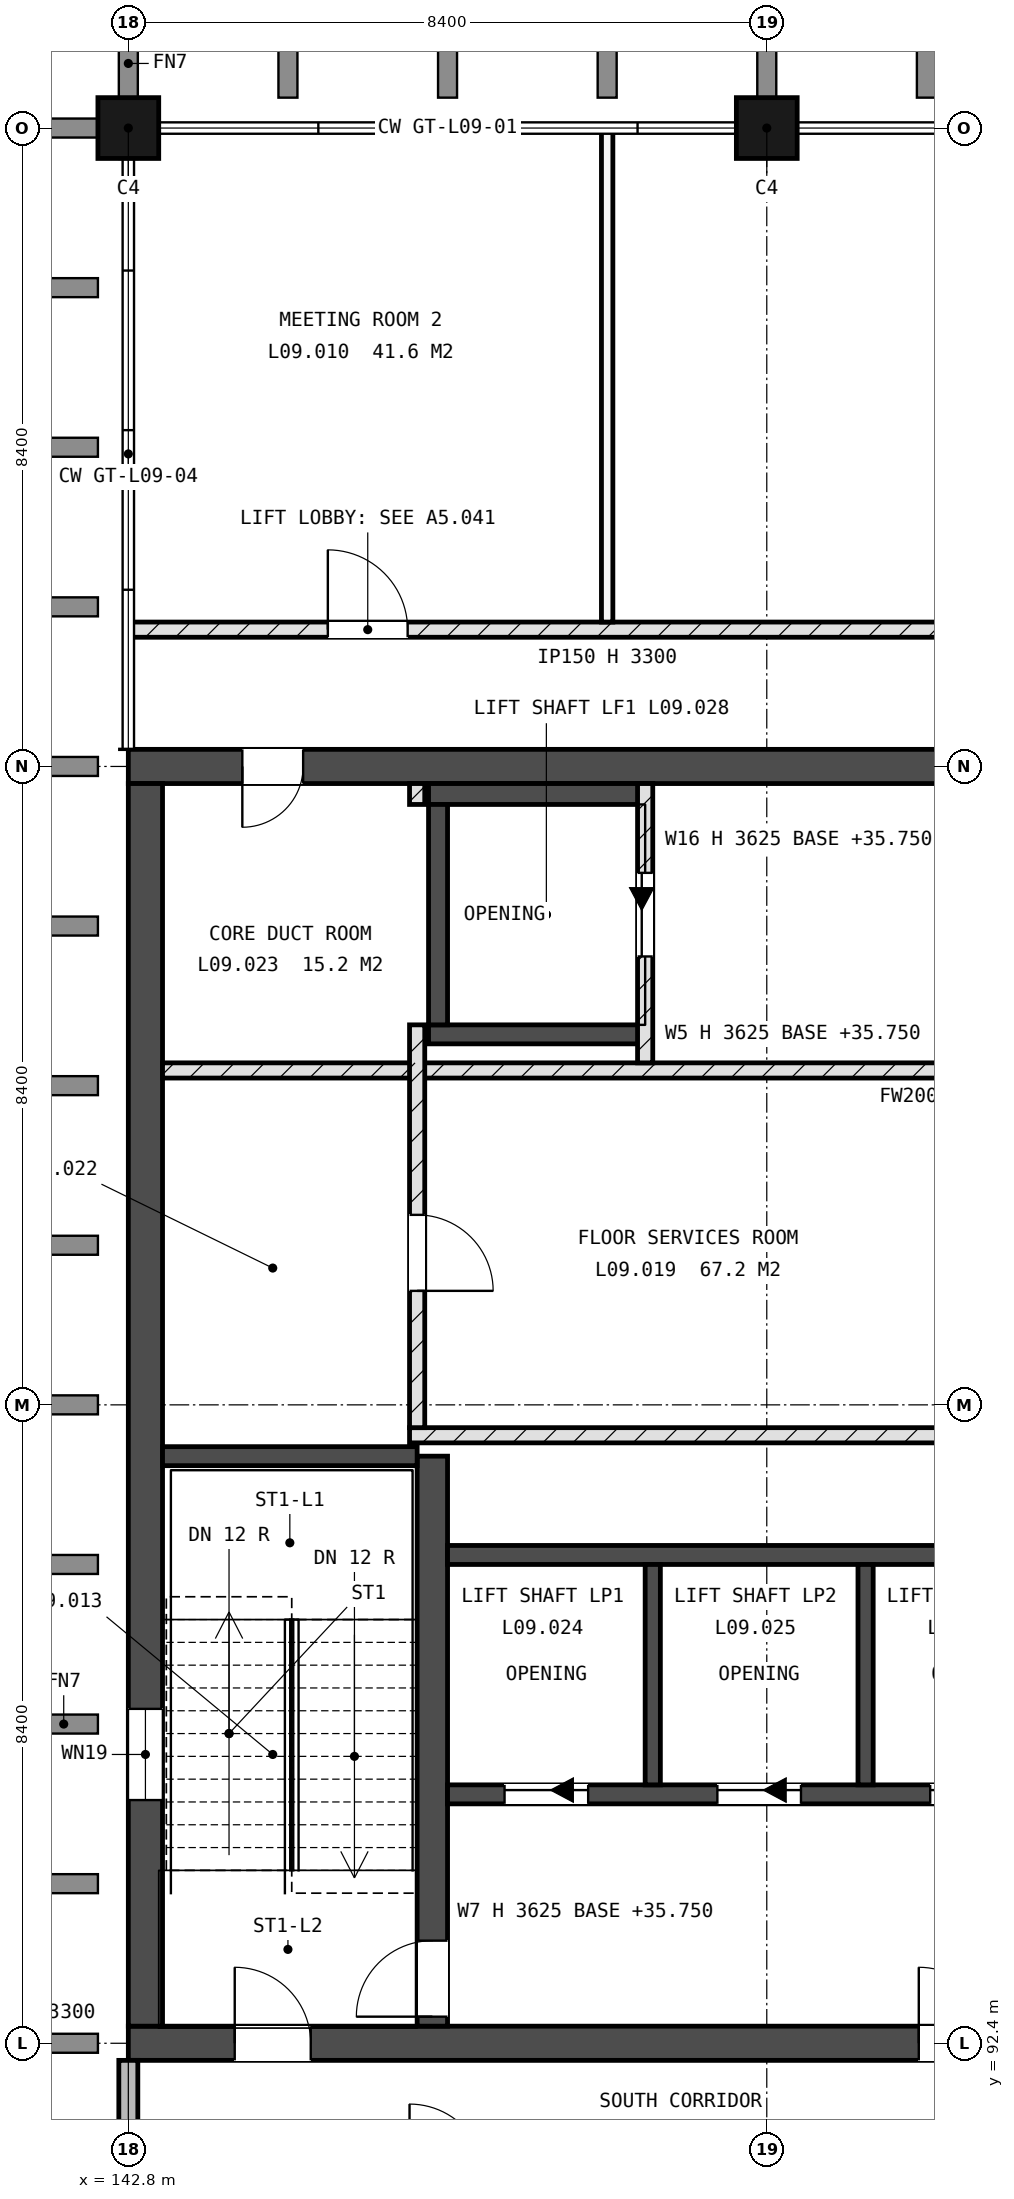
"""IFC4 building model, lengths in metres.
Left out: names, types, materials, properties, quantities, classifications, styles, units other than length and angle.
Written with IfcOpenShell. Run it as: python <this file> out.ifc"""

import sys

from ifc_helpers import new_model, si_unit, direction, frame, frame_2d, origin, origin_2d, place, context, subcontext, project, spatial, rectangle, extrude, element, fill, save


model = new_model("IFC4")
c1 = context("Model", 3, precision=1e-05, world=origin(), true_north=direction((0.0, 1.0)))
c2 = subcontext(c1, "Body", "Model", "MODEL_VIEW")
j1 = project(units=[si_unit("LENGTHUNIT", "METRE"), si_unit("PLANEANGLEUNIT", "RADIAN")], contexts=[c1])
p1 = place(None, origin())
s1 = spatial("IfcSite", under=j1, at=p1, CompositionType="ELEMENT")
p2 = place(p1, origin())
s2 = spatial("IfcBuilding", under=s1, at=p2, CompositionType="ELEMENT")
p3 = place(p2, frame((0.0, 0.0, 36.0)))
s3 = spatial("IfcBuildingStorey", under=s2, at=p3, CompositionType="ELEMENT", Elevation=36.0)
for number, where, z_axis, x_axis in (
    (1, (142.8, 117.6, -0.25), (0.0, 0.0, 1.0), (1.0, 0.0, 0.0)),
    (2, (151.2, 117.6, -0.25), (0.0, 0.0, 1.0), (1.0, 0.0, 0.0)),
):
    element("IfcColumn", number, at=place(p3, frame(where, z_axis=z_axis, x_axis=x_axis)), inside=s3, PredefinedType="COLUMN", context=c2, shape_type="SweptSolid", body=[
        extrude(rectangle(XDim=0.8, YDim=0.8, at=origin_2d()), origin(), (0.0, 0.0, 1.0), 3.625),
    ])
p4 = place(p3, frame((142.8, 92.4, -0.25), z_axis=(0.0, 0.0, 1.0), x_axis=(1.0, 0.0, 0.0)))
e3 = element("IfcWall", 3, at=p4, inside=s3, PredefinedType="SHEAR", context=c2, shape_type="SweptSolid", body=[
    extrude(rectangle(XDim=25.2, YDim=0.45, at=frame_2d((12.6, 0.0))), origin(), (0.0, 0.0, 1.0), 3.625),
])
p5 = place(p4, frame((1.4, 0.0, 0.25)))
e4 = element("IfcOpeningElement", 4, at=p5, cuts=e3, PredefinedType="OPENING", context=c2, shape_type="SweptSolid", body=[
    extrude(rectangle(XDim=1.0, YDim=2.1, at=frame_2d((0.5, 1.05))), frame((0.0, 0.235, 0.0), z_axis=(0.0, -1.0, 0.0), x_axis=(1.0, 0.0, 0.0)), (0.0, 0.0, 1.0), 0.47),
])
p6 = place(p4, frame((19.1, 0.0, 0.25)))
e5 = element("IfcOpeningElement", 5, at=p6, cuts=e3, PredefinedType="OPENING", context=c2, shape_type="SweptSolid", body=[
    extrude(rectangle(XDim=1.0, YDim=2.1, at=frame_2d((0.5, 1.05))), frame((0.0, 0.235, 0.0), z_axis=(0.0, -1.0, 0.0), x_axis=(1.0, 0.0, 0.0)), (0.0, 0.0, 1.0), 0.47),
])
p7 = place(p4, frame((10.4, 0.0, 0.25)))
e6 = element("IfcOpeningElement", 6, at=p7, cuts=e3, PredefinedType="OPENING", context=c2, shape_type="SweptSolid", body=[
    extrude(rectangle(XDim=1.0, YDim=2.1, at=frame_2d((0.5, 1.05))), frame((0.0, 0.235, 0.0), z_axis=(0.0, -1.0, 0.0), x_axis=(1.0, 0.0, 0.0)), (0.0, 0.0, 1.0), 0.47),
])
p8 = place(p3, frame((142.8, 109.2, -0.25), z_axis=(0.0, 0.0, 1.0), x_axis=(1.0, 0.0, 0.0)))
e7 = element("IfcWall", 7, at=p8, inside=s3, PredefinedType="SHEAR", context=c2, shape_type="SweptSolid", body=[
    extrude(rectangle(XDim=25.2, YDim=0.45, at=frame_2d((12.6, 0.0))), origin(), (0.0, 0.0, 1.0), 3.625),
])
p9 = place(p8, frame((22.8, 0.0, 0.25)))
e8 = element("IfcOpeningElement", 8, at=p9, cuts=e7, PredefinedType="OPENING", context=c2, shape_type="SweptSolid", body=[
    extrude(rectangle(XDim=1.0, YDim=2.1, at=frame_2d((0.5, 1.05))), frame((0.0, 0.235, 0.0), z_axis=(0.0, -1.0, 0.0), x_axis=(1.0, 0.0, 0.0)), (0.0, 0.0, 1.0), 0.47),
])
p10 = place(p8, frame((1.5, 0.0, 0.25)))
e9 = element("IfcOpeningElement", 9, at=p10, cuts=e7, PredefinedType="OPENING", context=c2, shape_type="SweptSolid", body=[
    extrude(rectangle(XDim=0.8, YDim=2.1, at=frame_2d((0.4, 1.05))), frame((0.0, 0.235, 0.0), z_axis=(0.0, -1.0, 0.0), x_axis=(1.0, 0.0, 0.0)), (0.0, 0.0, 1.0), 0.47),
])
p11 = place(p8, frame((13.4, 0.0, 0.25)))
e10 = element("IfcOpeningElement", 10, at=p11, cuts=e7, PredefinedType="OPENING", context=c2, shape_type="SweptSolid", body=[
    extrude(rectangle(XDim=1.0, YDim=2.1, at=frame_2d((0.5, 1.05))), frame((0.0, 0.235, 0.0), z_axis=(0.0, -1.0, 0.0), x_axis=(1.0, 0.0, 0.0)), (0.0, 0.0, 1.0), 0.47),
])
p12 = place(p3, frame((143.025, 92.625, -0.25), z_axis=(0.0, 0.0, 1.0), x_axis=(0.0, 1.0, 0.0)))
e11 = element("IfcWall", 11, at=p12, inside=s3, PredefinedType="SHEAR", context=c2, shape_type="SweptSolid", body=[
    extrude(rectangle(XDim=16.35, YDim=0.45, at=frame_2d((8.175, 0.0))), origin(), (0.0, 0.0, 1.0), 3.625),
])
p13 = place(p12, frame((2.975, 0.0, 1.85)))
e12 = element("IfcOpeningElement", 12, at=p13, cuts=e11, PredefinedType="OPENING", context=c2, shape_type="SweptSolid", body=[
    extrude(rectangle(XDim=1.2, YDim=0.9, at=frame_2d((0.6, 0.45))), frame((0.0, 0.235, 0.0), z_axis=(0.0, -1.0, 0.0), x_axis=(1.0, 0.0, 0.0)), (0.0, 0.0, 1.0), 0.47),
])
p14 = place(p3, frame((146.8, 92.625, -0.25), z_axis=(0.0, 0.0, 1.0), x_axis=(0.0, 1.0, 0.0)))
e13 = element("IfcWall", 13, at=p14, inside=s3, PredefinedType="SHEAR", context=c2, shape_type="SweptSolid", body=[
    extrude(rectangle(XDim=7.5, YDim=0.4, at=frame_2d((3.75, 0.0))), origin(), (0.0, 0.0, 1.0), 3.625),
])
p15 = place(p14, frame((0.125, 0.0, 0.25)))
e14 = element("IfcOpeningElement", 14, at=p15, cuts=e13, PredefinedType="OPENING", context=c2, shape_type="SweptSolid", body=[
    extrude(rectangle(XDim=1.0, YDim=2.1, at=frame_2d((0.5, 1.05))), frame((0.0, 0.21, 0.0), z_axis=(0.0, -1.0, 0.0), x_axis=(1.0, 0.0, 0.0)), (0.0, 0.0, 1.0), 0.42),
])
p16 = place(p3, frame((143.25, 100.125, -0.25), z_axis=(0.0, 0.0, 1.0), x_axis=(1.0, 0.0, 0.0)))
e15 = element("IfcWall", 15, at=p16, inside=s3, PredefinedType="SHEAR", context=c2, shape_type="SweptSolid", body=[
    extrude(rectangle(XDim=3.35, YDim=0.25, at=frame_2d((1.675, 0.0))), origin(), (0.0, 0.0, 1.0), 3.625),
])
p17 = place(p3, frame((147.0, 95.675, -0.25), z_axis=(0.0, 0.0, 1.0), x_axis=(1.0, 0.0, 0.0)))
e16 = element("IfcWall", 16, at=p17, inside=s3, PredefinedType="SHEAR", context=c2, shape_type="SweptSolid", body=[
    extrude(rectangle(XDim=11.25, YDim=0.25, at=frame_2d((5.625, 0.0))), origin(), (0.0, 0.0, 1.0), 3.625),
])
p18 = place(p17, frame((0.75, 0.0, 0.25)))
e17 = element("IfcOpeningElement", 17, at=p18, cuts=e16, PredefinedType="OPENING", context=c2, shape_type="SweptSolid", body=[
    extrude(rectangle(XDim=1.1, YDim=2.1, at=frame_2d((0.55, 1.05))), frame((0.0, 0.135, 0.0), z_axis=(0.0, -1.0, 0.0), x_axis=(1.0, 0.0, 0.0)), (0.0, 0.0, 1.0), 0.27),
])
p19 = place(p17, frame((3.55, 0.0, 0.25)))
e18 = element("IfcOpeningElement", 18, at=p19, cuts=e16, PredefinedType="OPENING", context=c2, shape_type="SweptSolid", body=[
    extrude(rectangle(XDim=1.1, YDim=2.1, at=frame_2d((0.55, 1.05))), frame((0.0, 0.135, 0.0), z_axis=(0.0, -1.0, 0.0), x_axis=(1.0, 0.0, 0.0)), (0.0, 0.0, 1.0), 0.27),
])
p20 = place(p17, frame((6.35, 0.0, 0.25)))
e19 = element("IfcOpeningElement", 19, at=p20, cuts=e16, PredefinedType="OPENING", context=c2, shape_type="SweptSolid", body=[
    extrude(rectangle(XDim=1.1, YDim=2.1, at=frame_2d((0.55, 1.05))), frame((0.0, 0.135, 0.0), z_axis=(0.0, -1.0, 0.0), x_axis=(1.0, 0.0, 0.0)), (0.0, 0.0, 1.0), 0.27),
])
p21 = place(p17, frame((9.15, 0.0, 0.25)))
e20 = element("IfcOpeningElement", 20, at=p21, cuts=e16, PredefinedType="OPENING", context=c2, shape_type="SweptSolid", body=[
    extrude(rectangle(XDim=1.1, YDim=2.1, at=frame_2d((0.55, 1.05))), frame((0.0, 0.135, 0.0), z_axis=(0.0, -1.0, 0.0), x_axis=(1.0, 0.0, 0.0)), (0.0, 0.0, 1.0), 0.27),
])
p22 = place(p3, frame((147.0, 98.825, -0.25), z_axis=(0.0, 0.0, 1.0), x_axis=(1.0, 0.0, 0.0)))
e21 = element("IfcWall", 21, at=p22, inside=s3, PredefinedType="SHEAR", context=c2, shape_type="SweptSolid", body=[
    extrude(rectangle(XDim=11.25, YDim=0.25, at=frame_2d((5.625, 0.0))), origin(), (0.0, 0.0, 1.0), 3.625),
])
for number, where, z_axis, x_axis in (
    (22, (149.7, 95.8, -0.25), (0.0, 0.0, 1.0), (0.0, 1.0, 0.0)),
    (23, (152.5, 95.8, -0.25), (0.0, 0.0, 1.0), (0.0, 1.0, 0.0)),
):
    element("IfcWall", number, at=place(p3, frame(where, z_axis=z_axis, x_axis=x_axis)), inside=s3, PredefinedType="SHEAR", context=c2, shape_type="SweptSolid", body=[
        extrude(rectangle(XDim=2.9, YDim=0.2, at=frame_2d((1.45, 0.0))), origin(), (0.0, 0.0, 1.0), 3.625),
    ])
p23 = place(p3, frame((146.75, 105.675, -0.25), z_axis=(0.0, 0.0, 1.0), x_axis=(1.0, 0.0, 0.0)))
e24 = element("IfcWall", 24, at=p23, inside=s3, PredefinedType="SHEAR", context=c2, shape_type="SweptSolid", body=[
    extrude(rectangle(XDim=2.85, YDim=0.25, at=frame_2d((1.425, 0.0))), origin(), (0.0, 0.0, 1.0), 3.625),
])
p24 = place(p3, frame((146.75, 108.837, -0.25), z_axis=(0.0, 0.0, 1.0), x_axis=(1.0, 0.0, 0.0)))
e25 = element("IfcWall", 25, at=p24, inside=s3, PredefinedType="SHEAR", context=c2, shape_type="SweptSolid", body=[
    extrude(rectangle(XDim=2.85, YDim=0.275, at=frame_2d((1.425, 0.0))), origin(), (0.0, 0.0, 1.0), 3.625),
])
p25 = place(p3, frame((146.875, 105.8, -0.25), z_axis=(0.0, 0.0, 1.0), x_axis=(0.0, 1.0, 0.0)))
e26 = element("IfcWall", 26, at=p25, inside=s3, PredefinedType="SHEAR", context=c2, shape_type="SweptSolid", body=[
    extrude(rectangle(XDim=2.9, YDim=0.25, at=frame_2d((1.45, 0.0))), origin(), (0.0, 0.0, 1.0), 3.625),
])
p26 = place(p3, frame((142.8, 84.4, 0.0), z_axis=(0.0, 0.0, 1.0), x_axis=(0.0, 1.0, 0.0)))
e27 = element("IfcWall", 27, at=p26, inside=s3, PredefinedType="STANDARD", context=c2, shape_type="SweptSolid", body=[
    extrude(rectangle(XDim=7.775, YDim=0.25, at=frame_2d((3.888, 0.0))), origin(), (0.0, 0.0, 1.0), 3.3),
])
p27 = place(p26, frame((2.3, 0.0, 2.1)))
e28 = element("IfcOpeningElement", 28, at=p27, cuts=e27, PredefinedType="OPENING", context=c2, shape_type="SweptSolid", body=[
    extrude(rectangle(XDim=0.9, YDim=0.6, at=frame_2d((0.45, 0.3))), frame((0.0, 0.135, 0.0), z_axis=(0.0, -1.0, 0.0), x_axis=(1.0, 0.0, 0.0)), (0.0, 0.0, 1.0), 0.27),
])
p28 = place(p3, frame((146.5, 100.4, 0.0), z_axis=(0.0, 0.0, 1.0), x_axis=(1.0, 0.0, 0.0)))
e29 = element("IfcWall", 29, at=p28, inside=s3, PredefinedType="SOLIDWALL", context=c2, shape_type="SweptSolid", body=[
    extrude(rectangle(XDim=14.0, YDim=0.2, at=frame_2d((7.0, 0.0))), origin(), (0.0, 0.0, 1.0), 3.3),
])
p29 = place(p3, frame((143.25, 105.2, 0.0), z_axis=(0.0, 0.0, 1.0), x_axis=(1.0, 0.0, 0.0)))
e30 = element("IfcWall", 30, at=p29, inside=s3, PredefinedType="SOLIDWALL", context=c2, shape_type="SweptSolid", body=[
    extrude(rectangle(XDim=20.7, YDim=0.2, at=frame_2d((10.35, 0.0))), origin(), (0.0, 0.0, 1.0), 3.3),
])
p30 = place(p29, frame((11.45, 0.0, 0.0)))
e31 = element("IfcOpeningElement", 31, at=p30, cuts=e30, PredefinedType="OPENING", context=c2, shape_type="SweptSolid", body=[
    extrude(rectangle(XDim=0.8, YDim=2.1, at=frame_2d((0.4, 1.05))), frame((0.0, 0.11, 0.0), z_axis=(0.0, -1.0, 0.0), x_axis=(1.0, 0.0, 0.0)), (0.0, 0.0, 1.0), 0.22),
])
p31 = place(p29, frame((18.75, 0.0, 0.0)))
e32 = element("IfcOpeningElement", 32, at=p31, cuts=e30, PredefinedType="OPENING", context=c2, shape_type="SweptSolid", body=[
    extrude(rectangle(XDim=1.0, YDim=2.1, at=frame_2d((0.5, 1.05))), frame((0.0, 0.11, 0.0), z_axis=(0.0, -1.0, 0.0), x_axis=(1.0, 0.0, 0.0)), (0.0, 0.0, 1.0), 0.22),
])
p32 = place(p3, frame((142.8, 111.0, 0.0), z_axis=(0.0, 0.0, 1.0), x_axis=(1.0, 0.0, 0.0)))
e33 = element("IfcWall", 33, at=p32, inside=s3, PredefinedType="SOLIDWALL", context=c2, shape_type="SweptSolid", body=[
    extrude(rectangle(XDim=25.2, YDim=0.2, at=frame_2d((12.6, 0.0))), origin(), (0.0, 0.0, 1.0), 3.3),
])
p33 = place(p32, frame((2.625, 0.0, 0.0)))
e34 = element("IfcOpeningElement", 34, at=p33, cuts=e33, PredefinedType="OPENING", context=c2, shape_type="SweptSolid", body=[
    extrude(rectangle(XDim=1.05, YDim=2.1, at=frame_2d((0.525, 1.05))), frame((0.0, 0.11, 0.0), z_axis=(0.0, -1.0, 0.0), x_axis=(1.0, 0.0, 0.0)), (0.0, 0.0, 1.0), 0.22),
])
p34 = place(p32, frame((11.0, 0.0, 0.0)))
e35 = element("IfcOpeningElement", 35, at=p34, cuts=e33, PredefinedType="OPENING", context=c2, shape_type="SweptSolid", body=[
    extrude(rectangle(XDim=1.1, YDim=2.25, at=frame_2d((0.55, 1.125))), frame((0.0, 0.11, 0.0), z_axis=(0.0, -1.0, 0.0), x_axis=(1.0, 0.0, 0.0)), (0.0, 0.0, 1.0), 0.22),
])
p35 = place(p32, frame((20.45, 0.0, 0.0)))
e36 = element("IfcOpeningElement", 36, at=p35, cuts=e33, PredefinedType="OPENING", context=c2, shape_type="SweptSolid", body=[
    extrude(rectangle(XDim=1.1, YDim=2.25, at=frame_2d((0.55, 1.125))), frame((0.0, 0.11, 0.0), z_axis=(0.0, -1.0, 0.0), x_axis=(1.0, 0.0, 0.0)), (0.0, 0.0, 1.0), 0.22),
])
p36 = place(p3, frame((146.6, 100.5, 0.0), z_axis=(0.0, 0.0, 1.0), x_axis=(0.0, 1.0, 0.0)))
e37 = element("IfcWall", 37, at=p36, inside=s3, PredefinedType="SOLIDWALL", context=c2, shape_type="SweptSolid", body=[
    extrude(rectangle(XDim=5.3, YDim=0.2, at=frame_2d((2.65, 0.0))), origin(), (0.0, 0.0, 1.0), 3.3),
])
p37 = place(p36, frame((1.8, 0.0, 0.0)))
e38 = element("IfcOpeningElement", 38, at=p37, cuts=e37, PredefinedType="OPENING", context=c2, shape_type="SweptSolid", body=[
    extrude(rectangle(XDim=1.0, YDim=2.1, at=frame_2d((0.5, 1.05))), frame((0.0, 0.11, 0.0), z_axis=(0.0, -1.0, 0.0), x_axis=(1.0, 0.0, 0.0)), (0.0, 0.0, 1.0), 0.22),
])
p38 = place(p3, frame((146.6, 108.7, 0.0), z_axis=(0.0, 0.0, 1.0), x_axis=(0.0, 1.0, 0.0)))
e39 = element("IfcWall", 39, at=p38, inside=s3, PredefinedType="SOLIDWALL", context=c2, shape_type="SweptSolid", body=[
    extrude(rectangle(XDim=0.275, YDim=0.2, at=frame_2d((0.138, 0.0))), origin(), (0.0, 0.0, 1.0), 3.3),
])
p39 = place(p3, frame((149.1, 111.1, 0.0), z_axis=(0.0, 0.0, 1.0), x_axis=(0.0, 1.0, 0.0)))
e40 = element("IfcWall", 40, at=p39, inside=s3, PredefinedType="PARTITIONING", context=c2, shape_type="SweptSolid", body=[
    extrude(rectangle(XDim=6.5, YDim=0.15, at=frame_2d((3.25, 0.0))), origin(), (0.0, 0.0, 1.0), 3.3),
])
p40 = place(p3, frame((149.6, 105.3, 0.0), z_axis=(0.0, 0.0, 1.0), x_axis=(0.0, 1.0, 0.0)))
e41 = element("IfcWall", 41, at=p40, inside=s3, PredefinedType="SOLIDWALL", context=c2, shape_type="SweptSolid", body=[
    extrude(rectangle(XDim=3.675, YDim=0.2, at=frame_2d((1.837, 0.0))), origin(), (0.0, 0.0, 1.0), 3.3),
])
p41 = place(p40, frame((1.4, 0.0, 0.0)))
e42 = element("IfcOpeningElement", 42, at=p41, cuts=e41, PredefinedType="OPENING", context=c2, shape_type="SweptSolid", body=[
    extrude(rectangle(XDim=1.1, YDim=2.1, at=frame_2d((0.55, 1.05))), frame((0.0, 0.11, 0.0), z_axis=(0.0, -1.0, 0.0), x_axis=(1.0, 0.0, 0.0)), (0.0, 0.0, 1.0), 0.22),
])
p42 = place(p13, origin())
e43 = element("IfcWindow", 43, at=p42, inside=s3, PartitioningType="SINGLE_PANEL", PredefinedType="WINDOW", context=c2, shape_type="SweptSolid", body=[
    extrude(rectangle(XDim=1.2, YDim=0.9, at=frame_2d((0.6, 0.45))), frame((0.0, 0.03, 0.0), z_axis=(0.0, -1.0, 0.0), x_axis=(1.0, 0.0, 0.0)), (0.0, 0.0, 1.0), 0.06),
])
fill(e12, e43)
p43 = place(p18, origin())
e44 = element("IfcDoor", 44, at=p43, inside=s3, OperationType="SLIDING_TO_LEFT", PredefinedType="DOOR", context=c2, shape_type="SweptSolid", body=[
    extrude(rectangle(XDim=1.1, YDim=2.1, at=frame_2d((0.55, 1.05))), frame((0.0, 0.025, 0.0), z_axis=(0.0, -1.0, 0.0), x_axis=(1.0, 0.0, 0.0)), (0.0, 0.0, 1.0), 0.05),
])
fill(e17, e44)
p44 = place(p19, origin())
e45 = element("IfcDoor", 45, at=p44, inside=s3, OperationType="SLIDING_TO_LEFT", PredefinedType="DOOR", context=c2, shape_type="SweptSolid", body=[
    extrude(rectangle(XDim=1.1, YDim=2.1, at=frame_2d((0.55, 1.05))), frame((0.0, 0.025, 0.0), z_axis=(0.0, -1.0, 0.0), x_axis=(1.0, 0.0, 0.0)), (0.0, 0.0, 1.0), 0.05),
])
fill(e18, e45)
p45 = place(p20, origin())
e46 = element("IfcDoor", 46, at=p45, inside=s3, OperationType="SLIDING_TO_LEFT", PredefinedType="DOOR", context=c2, shape_type="SweptSolid", body=[
    extrude(rectangle(XDim=1.1, YDim=2.1, at=frame_2d((0.55, 1.05))), frame((0.0, 0.025, 0.0), z_axis=(0.0, -1.0, 0.0), x_axis=(1.0, 0.0, 0.0)), (0.0, 0.0, 1.0), 0.05),
])
fill(e19, e46)
p46 = place(p41, origin())
e47 = element("IfcDoor", 47, at=p46, inside=s3, OperationType="SLIDING_TO_LEFT", PredefinedType="DOOR", context=c2, shape_type="SweptSolid", body=[
    extrude(rectangle(XDim=1.1, YDim=2.1, at=frame_2d((0.55, 1.05))), frame((0.0, 0.025, 0.0), z_axis=(0.0, -1.0, 0.0), x_axis=(1.0, 0.0, 0.0)), (0.0, 0.0, 1.0), 0.05),
])
fill(e42, e47)
p47 = place(p5, origin())
e48 = element("IfcDoor", 48, at=p47, inside=s3, OperationType="SINGLE_SWING_RIGHT", PredefinedType="DOOR", context=c2, shape_type="SweptSolid", body=[
    extrude(rectangle(XDim=1.0, YDim=2.1, at=frame_2d((0.5, 1.05))), frame((0.0, 0.025, 0.0), z_axis=(0.0, -1.0, 0.0), x_axis=(1.0, 0.0, 0.0)), (0.0, 0.0, 1.0), 0.05),
])
fill(e4, e48)
p48 = place(p15, origin())
e49 = element("IfcDoor", 49, at=p48, inside=s3, OperationType="SINGLE_SWING_RIGHT", PredefinedType="DOOR", context=c2, shape_type="SweptSolid", body=[
    extrude(rectangle(XDim=1.0, YDim=2.1, at=frame_2d((0.5, 1.05))), frame((0.0, 0.025, 0.0), z_axis=(0.0, -1.0, 0.0), x_axis=(1.0, 0.0, 0.0)), (0.0, 0.0, 1.0), 0.05),
])
fill(e14, e49)
p49 = place(p33, origin())
e50 = element("IfcDoor", 50, at=p49, inside=s3, OperationType="SINGLE_SWING_RIGHT", PredefinedType="DOOR", context=c2, shape_type="SweptSolid", body=[
    extrude(rectangle(XDim=1.05, YDim=2.1, at=frame_2d((0.525, 1.05))), frame((0.0, 0.025, 0.0), z_axis=(0.0, -1.0, 0.0), x_axis=(1.0, 0.0, 0.0)), (0.0, 0.0, 1.0), 0.05),
])
fill(e34, e50)
p50 = place(p37, origin())
e51 = element("IfcDoor", 51, at=p50, inside=s3, OperationType="SINGLE_SWING_LEFT", PredefinedType="DOOR", context=c2, shape_type="SweptSolid", body=[
    extrude(rectangle(XDim=1.0, YDim=2.1, at=frame_2d((0.5, 1.05))), frame((0.0, 0.025, 0.0), z_axis=(0.0, -1.0, 0.0), x_axis=(1.0, 0.0, 0.0)), (0.0, 0.0, 1.0), 0.05),
])
fill(e38, e51)
p51 = place(p10, origin())
e52 = element("IfcDoor", 52, at=p51, inside=s3, OperationType="SINGLE_SWING_LEFT", PredefinedType="DOOR", context=c2, shape_type="SweptSolid", body=[
    extrude(rectangle(XDim=0.8, YDim=2.1, at=frame_2d((0.4, 1.05))), frame((0.0, 0.025, 0.0), z_axis=(0.0, -1.0, 0.0), x_axis=(1.0, 0.0, 0.0)), (0.0, 0.0, 1.0), 0.05),
])
fill(e9, e52)
p52 = place(p7, origin())
e53 = element("IfcDoor", 53, at=p52, inside=s3, OperationType="SINGLE_SWING_RIGHT", PredefinedType="DOOR", context=c2, shape_type="SweptSolid", body=[
    extrude(rectangle(XDim=1.0, YDim=2.1, at=frame_2d((0.5, 1.05))), frame((0.0, 0.025, 0.0), z_axis=(0.0, -1.0, 0.0), x_axis=(1.0, 0.0, 0.0)), (0.0, 0.0, 1.0), 0.05),
])
fill(e6, e53)
save(model, sys.argv[1])
